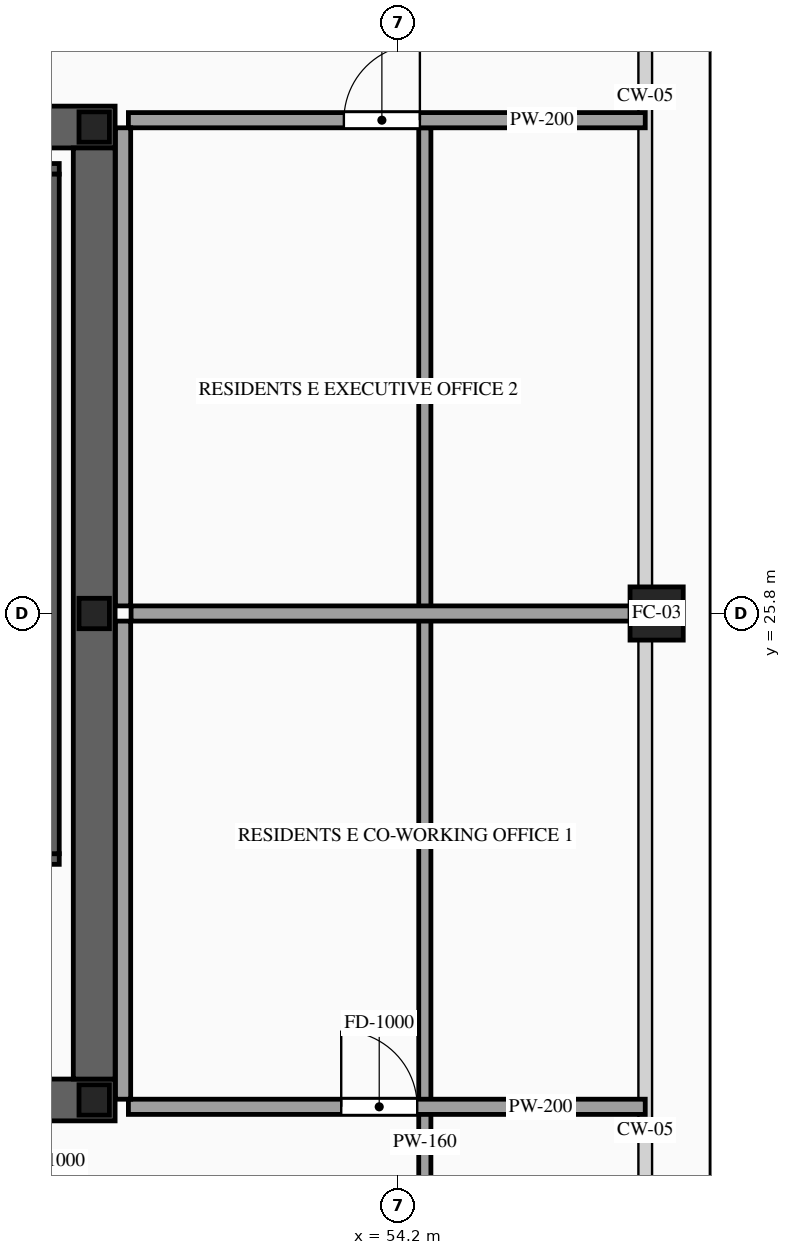
"""IFC4 building model, lengths in metres.
Left out: names, types, materials, properties, quantities, classifications, styles, units other than length and angle.
Written with IfcOpenShell. Run it as: python <this file> out.ifc"""

import sys

from ifc_helpers import new_model, si_unit, direction, frame, frame_2d, origin, origin_2d, place, context, subcontext, project, spatial, rectangle, hollow_rectangle, i_section, extrude, source, transform, mapped, element, fill, save


model = new_model("IFC4")
c1 = context("Model", 3, precision=1e-05, world=origin(), true_north=direction((0.0, 1.0)))
c2 = subcontext(c1, "Body", "Model", "MODEL_VIEW")
j1 = project(units=[si_unit("LENGTHUNIT", "METRE"), si_unit("PLANEANGLEUNIT", "RADIAN")], contexts=[c1])
p1 = place(None, origin())
s1 = spatial("IfcSite", under=j1, at=p1, CompositionType="ELEMENT")
p2 = place(p1, origin())
s2 = spatial("IfcBuilding", under=s1, at=p2, CompositionType="ELEMENT")
p3 = place(p2, frame((0.0, 0.0, 245.1)))
s3 = spatial("IfcBuildingStorey", under=s2, at=p3, CompositionType="ELEMENT", Elevation=245.1)
p4 = place(p3, frame((23.525, 19.4, 0.0), z_axis=(0.0, 0.0, 1.0), x_axis=(1.0, 0.0, 0.0)))
e1 = element("IfcWall", 1, at=p4, inside=s3, PredefinedType="SHEAR", context=c2, shape_type="SweptSolid", body=[
    extrude(rectangle(XDim=26.95, YDim=0.55, at=frame_2d((13.475, 0.0))), origin(), (0.0, 0.0, 1.0), 3.5),
])
p5 = place(p4, frame((1.925, 0.0, 0.0)))
e2 = element("IfcOpeningElement", 2, at=p5, cuts=e1, PredefinedType="OPENING", context=c2, shape_type="SweptSolid", body=[
    extrude(rectangle(XDim=1.1, YDim=2.2, at=frame_2d((0.55, 1.1))), frame((0.0, 0.29, 0.0), z_axis=(0.0, -1.0, 0.0), x_axis=(1.0, 0.0, 0.0)), (0.0, 0.0, 1.0), 0.58),
])
p6 = place(p4, frame((9.825, 0.0, 0.0)))
e3 = element("IfcOpeningElement", 3, at=p6, cuts=e1, PredefinedType="OPENING", context=c2, shape_type="SweptSolid", body=[
    extrude(rectangle(XDim=1.1, YDim=2.2, at=frame_2d((0.55, 1.1))), frame((0.0, 0.29, 0.0), z_axis=(0.0, -1.0, 0.0), x_axis=(1.0, 0.0, 0.0)), (0.0, 0.0, 1.0), 0.58),
])
p7 = place(p4, frame((23.025, 0.0, 0.0)))
e4 = element("IfcOpeningElement", 4, at=p7, cuts=e1, PredefinedType="OPENING", context=c2, shape_type="SweptSolid", body=[
    extrude(rectangle(XDim=1.1, YDim=2.2, at=frame_2d((0.55, 1.1))), frame((0.0, 0.29, 0.0), z_axis=(0.0, -1.0, 0.0), x_axis=(1.0, 0.0, 0.0)), (0.0, 0.0, 1.0), 0.58),
])
p8 = place(p4, frame((19.645, 0.0, 0.0)))
e5 = element("IfcOpeningElement", 5, at=p8, cuts=e1, PredefinedType="OPENING", context=c2, shape_type="SweptSolid", body=[
    extrude(rectangle(XDim=0.9, YDim=2.15, at=frame_2d((0.45, 1.075))), frame((0.0, 0.29, 0.0), z_axis=(0.0, -1.0, 0.0), x_axis=(1.0, 0.0, 0.0)), (0.0, 0.0, 1.0), 0.58),
])
p9 = place(p4, frame((18.205, 0.0, 0.0)))
e6 = element("IfcOpeningElement", 6, at=p9, cuts=e1, PredefinedType="OPENING", context=c2, shape_type="SweptSolid", body=[
    extrude(rectangle(XDim=0.9, YDim=2.15, at=frame_2d((0.45, 1.075))), frame((0.0, 0.29, 0.0), z_axis=(0.0, -1.0, 0.0), x_axis=(1.0, 0.0, 0.0)), (0.0, 0.0, 1.0), 0.58),
])
p10 = place(p3, frame((23.525, 32.2, 0.0), z_axis=(0.0, 0.0, 1.0), x_axis=(1.0, 0.0, 0.0)))
e7 = element("IfcWall", 7, at=p10, inside=s3, PredefinedType="SHEAR", context=c2, shape_type="SweptSolid", body=[
    extrude(rectangle(XDim=26.95, YDim=0.55, at=frame_2d((13.475, 0.0))), origin(), (0.0, 0.0, 1.0), 3.5),
])
p11 = place(p10, frame((4.545, 0.0, 0.0)))
e8 = element("IfcOpeningElement", 8, at=p11, cuts=e7, PredefinedType="OPENING", context=c2, shape_type="SweptSolid", body=[
    extrude(rectangle(XDim=0.9, YDim=2.15, at=frame_2d((0.45, 1.075))), frame((0.0, 0.29, 0.0), z_axis=(0.0, -1.0, 0.0), x_axis=(1.0, 0.0, 0.0)), (0.0, 0.0, 1.0), 0.58),
])
p12 = place(p10, frame((9.825, 0.0, 0.0)))
e9 = element("IfcOpeningElement", 9, at=p12, cuts=e7, PredefinedType="OPENING", context=c2, shape_type="SweptSolid", body=[
    extrude(rectangle(XDim=1.1, YDim=2.2, at=frame_2d((0.55, 1.1))), frame((0.0, 0.29, 0.0), z_axis=(0.0, -1.0, 0.0), x_axis=(1.0, 0.0, 0.0)), (0.0, 0.0, 1.0), 0.58),
])
p13 = place(p10, frame((15.675, 0.0, 0.0)))
e10 = element("IfcOpeningElement", 10, at=p13, cuts=e7, PredefinedType="OPENING", context=c2, shape_type="SweptSolid", body=[
    extrude(rectangle(XDim=1.1, YDim=2.2, at=frame_2d((0.55, 1.1))), frame((0.0, 0.29, 0.0), z_axis=(0.0, -1.0, 0.0), x_axis=(1.0, 0.0, 0.0)), (0.0, 0.0, 1.0), 0.58),
])
m1 = source(origin(), c2, "Body", "SweptSolid", [
    extrude(rectangle(XDim=12.25, YDim=0.55, at=frame_2d((6.125, 0.0))), origin(), (0.0, 0.0, 1.0), 3.5),
])
p14 = place(p3, frame((50.2, 19.675, 0.0), z_axis=(0.0, 0.0, 1.0), x_axis=(0.0, 1.0, 0.0)))
e11 = element("IfcWall", 11, at=p14, inside=s3, PredefinedType="SHEAR", context=c2, shape_type="MappedRepresentation", body=[
    mapped(m1, transform((0.0, 0.0, 0.0), scale=1.0)),
])
m2 = source(origin(), c2, "Body", "SweptSolid", [
    extrude(i_section(OverallWidth=0.4, OverallDepth=0.4, WebThickness=0.013, FlangeThickness=0.021, at=origin_2d()), origin(), (0.0, 0.0, 1.0), 3.5),
])
for number, where, z_axis, x_axis in (
    (12, (50.2, 19.4, 0.0), (0.0, 0.0, 1.0), (1.0, 0.0, 0.0)),
    (13, (50.2, 25.8, 0.0), (0.0, 0.0, 1.0), (1.0, 0.0, 0.0)),
    (14, (50.2, 32.2, 0.0), (0.0, 0.0, 1.0), (1.0, 0.0, 0.0)),
):
    element("IfcColumn", number, at=place(p3, frame(where, z_axis=z_axis, x_axis=x_axis)), inside=s3, PredefinedType="COLUMN", context=c2, shape_type="MappedRepresentation", body=[
        mapped(m2, transform((0.0, 0.0, 0.0), scale=1.0)),
    ])
m3 = source(origin(), c2, "Body", "SweptSolid", [
    extrude(hollow_rectangle(XDim=0.7, YDim=0.7, WallThickness=0.032, at=origin_2d()), origin(), (0.0, 0.0, 1.0), 3.5),
])
p15 = place(p3, frame((57.6, 25.8, 0.0), z_axis=(0.0, 0.0, 1.0), x_axis=(1.0, 0.0, 0.0)))
e15 = element("IfcColumn", 15, at=p15, inside=s3, PredefinedType="COLUMN", context=c2, shape_type="MappedRepresentation", body=[
    mapped(m3, transform((0.0, 0.0, 0.0), scale=1.0)),
])
p16 = place(p3, frame((46.46, 22.57, 0.0), z_axis=(0.0, 0.0, 1.0), x_axis=(1.0, 0.0, 0.0)))
e16 = element("IfcWall", 16, at=p16, inside=s3, PredefinedType="SOLIDWALL", context=c2, shape_type="SweptSolid", body=[
    extrude(rectangle(XDim=3.28, YDim=0.14, at=frame_2d((1.64, 0.0))), origin(), (0.0, 0.0, 1.0), 3.28),
])
p17 = place(p16, frame((1.09, 0.0, 0.0)))
e17 = element("IfcOpeningElement", 17, at=p17, cuts=e16, PredefinedType="OPENING", context=c2, shape_type="SweptSolid", body=[
    extrude(rectangle(XDim=1.1, YDim=2.2, at=frame_2d((0.55, 1.1))), frame((0.0, 0.085, 0.0), z_axis=(0.0, -1.0, 0.0), x_axis=(1.0, 0.0, 0.0)), (0.0, 0.0, 1.0), 0.17),
])
m4 = source(origin(), c2, "Body", "SweptSolid", [
    extrude(rectangle(XDim=3.28, YDim=0.14, at=frame_2d((1.64, 0.0))), origin(), (0.0, 0.0, 1.0), 3.28),
])
p18 = place(p3, frame((46.46, 31.65, 0.0), z_axis=(0.0, 0.0, 1.0), x_axis=(1.0, 0.0, 0.0)))
e18 = element("IfcWall", 18, at=p18, inside=s3, PredefinedType="SOLIDWALL", context=c2, shape_type="MappedRepresentation", body=[
    mapped(m4, transform((0.0, 0.0, 0.0), scale=1.0)),
])
m5 = source(origin(), c2, "Body", "SweptSolid", [
    extrude(rectangle(XDim=8.94, YDim=0.14, at=frame_2d((4.47, 0.0))), origin(), (0.0, 0.0, 1.0), 3.28),
])
p19 = place(p3, frame((49.67, 22.64, 0.0), z_axis=(0.0, 0.0, 1.0), x_axis=(0.0, 1.0, 0.0)))
e19 = element("IfcWall", 19, at=p19, inside=s3, PredefinedType="SOLIDWALL", context=c2, shape_type="MappedRepresentation", body=[
    mapped(m5, transform((0.0, 0.0, 0.0), scale=1.0)),
])
m6 = source(origin(), c2, "Body", "SweptSolid", [
    extrude(rectangle(XDim=26.69, YDim=0.16, at=frame_2d((13.345, 0.0))), origin(), (0.0, 0.0, 1.0), 3.28),
])
p20 = place(p3, frame((54.55, 5.5, 0.0), z_axis=(0.0, 0.0, 1.0), x_axis=(0.0, 1.0, 0.0)))
e20 = element("IfcWall", 20, at=p20, inside=s3, PredefinedType="PARTITIONING", context=c2, shape_type="MappedRepresentation", body=[
    mapped(m6, transform((0.0, 0.0, 0.0), scale=1.0)),
])
p21 = place(p3, frame((50.65, 19.31, 0.0), z_axis=(0.0, 0.0, 1.0), x_axis=(1.0, 0.0, 0.0)))
e21 = element("IfcWall", 21, at=p21, inside=s3, PredefinedType="PARTITIONING", context=c2, shape_type="SweptSolid", body=[
    extrude(rectangle(XDim=6.8, YDim=0.2, at=frame_2d((3.4, 0.0))), origin(), (0.0, 0.0, 1.0), 2.825),
])
p22 = place(p21, frame((2.8, 0.0, 0.0)))
e22 = element("IfcOpeningElement", 22, at=p22, cuts=e21, PredefinedType="OPENING", context=c2, shape_type="SweptSolid", body=[
    extrude(rectangle(XDim=1.0, YDim=2.2, at=frame_2d((0.5, 1.1))), frame((0.0, 0.115, 0.0), z_axis=(0.0, -1.0, 0.0), x_axis=(1.0, 0.0, 0.0)), (0.0, 0.0, 1.0), 0.23),
])
m7 = source(origin(), c2, "Body", "SweptSolid", [
    extrude(rectangle(XDim=6.765, YDim=0.2, at=frame_2d((3.382, 0.0))), origin(), (0.0, 0.0, 1.0), 2.787),
])
p23 = place(p3, frame((50.685, 25.8, 0.0), z_axis=(0.0, 0.0, 1.0), x_axis=(1.0, 0.0, 0.0)))
e23 = element("IfcWall", 23, at=p23, inside=s3, PredefinedType="PARTITIONING", context=c2, shape_type="MappedRepresentation", body=[
    mapped(m7, transform((0.0, 0.0, 0.0), scale=1.0)),
])
m8 = source(origin(), c2, "Body", "SweptSolid", [
    extrude(rectangle(XDim=6.29, YDim=0.2, at=frame_2d((3.145, 0.0))), origin(), (0.0, 0.0, 1.0), 3.28),
])
p24 = place(p3, frame((50.58, 19.41, 0.0), z_axis=(0.0, 0.0, 1.0), x_axis=(0.0, 1.0, 0.0)))
e24 = element("IfcWall", 24, at=p24, inside=s3, PredefinedType="PARTITIONING", context=c2, shape_type="MappedRepresentation", body=[
    mapped(m8, transform((0.0, 0.0, 0.0), scale=1.0)),
])
p25 = place(p3, frame((50.65, 32.29, 0.0), z_axis=(0.0, 0.0, 1.0), x_axis=(1.0, 0.0, 0.0)))
e25 = element("IfcWall", 25, at=p25, inside=s3, PredefinedType="PARTITIONING", context=c2, shape_type="SweptSolid", body=[
    extrude(rectangle(XDim=6.8, YDim=0.2, at=frame_2d((3.4, 0.0))), origin(), (0.0, 0.0, 1.0), 2.825),
])
p26 = place(p25, frame((2.835, 0.0, 0.0)))
e26 = element("IfcOpeningElement", 26, at=p26, cuts=e25, PredefinedType="OPENING", context=c2, shape_type="SweptSolid", body=[
    extrude(rectangle(XDim=1.0, YDim=2.2, at=frame_2d((0.5, 1.1))), frame((0.0, 0.115, 0.0), z_axis=(0.0, -1.0, 0.0), x_axis=(1.0, 0.0, 0.0)), (0.0, 0.0, 1.0), 0.23),
])
p27 = place(p3, frame((50.58, 25.9, 0.0), z_axis=(0.0, 0.0, 1.0), x_axis=(0.0, 1.0, 0.0)))
e27 = element("IfcWall", 27, at=p27, inside=s3, PredefinedType="PARTITIONING", context=c2, shape_type="MappedRepresentation", body=[
    mapped(m8, transform((0.0, 0.0, 0.0), scale=1.0)),
])
m9 = source(origin(), c2, "Body", "SweptSolid", [
    extrude(rectangle(XDim=1.0, YDim=2.2, at=frame_2d((0.5, 1.1))), frame((0.0, 0.025, 0.0), z_axis=(0.0, -1.0, 0.0), x_axis=(1.0, 0.0, 0.0)), (0.0, 0.0, 1.0), 0.05),
])
p28 = place(p22, origin())
e28 = element("IfcDoor", 28, at=p28, inside=s3, OperationType="SINGLE_SWING_LEFT", PredefinedType="DOOR", context=c2, shape_type="MappedRepresentation", body=[
    mapped(m9, transform((0.0, 0.0, 0.0), scale=1.0)),
])
fill(e22, e28)
p29 = place(p26, origin())
e29 = element("IfcDoor", 29, at=p29, inside=s3, OperationType="SINGLE_SWING_RIGHT", PredefinedType="DOOR", context=c2, shape_type="MappedRepresentation", body=[
    mapped(m9, transform((0.0, 0.0, 0.0), scale=1.0)),
])
fill(e26, e29)
save(model, sys.argv[1])
